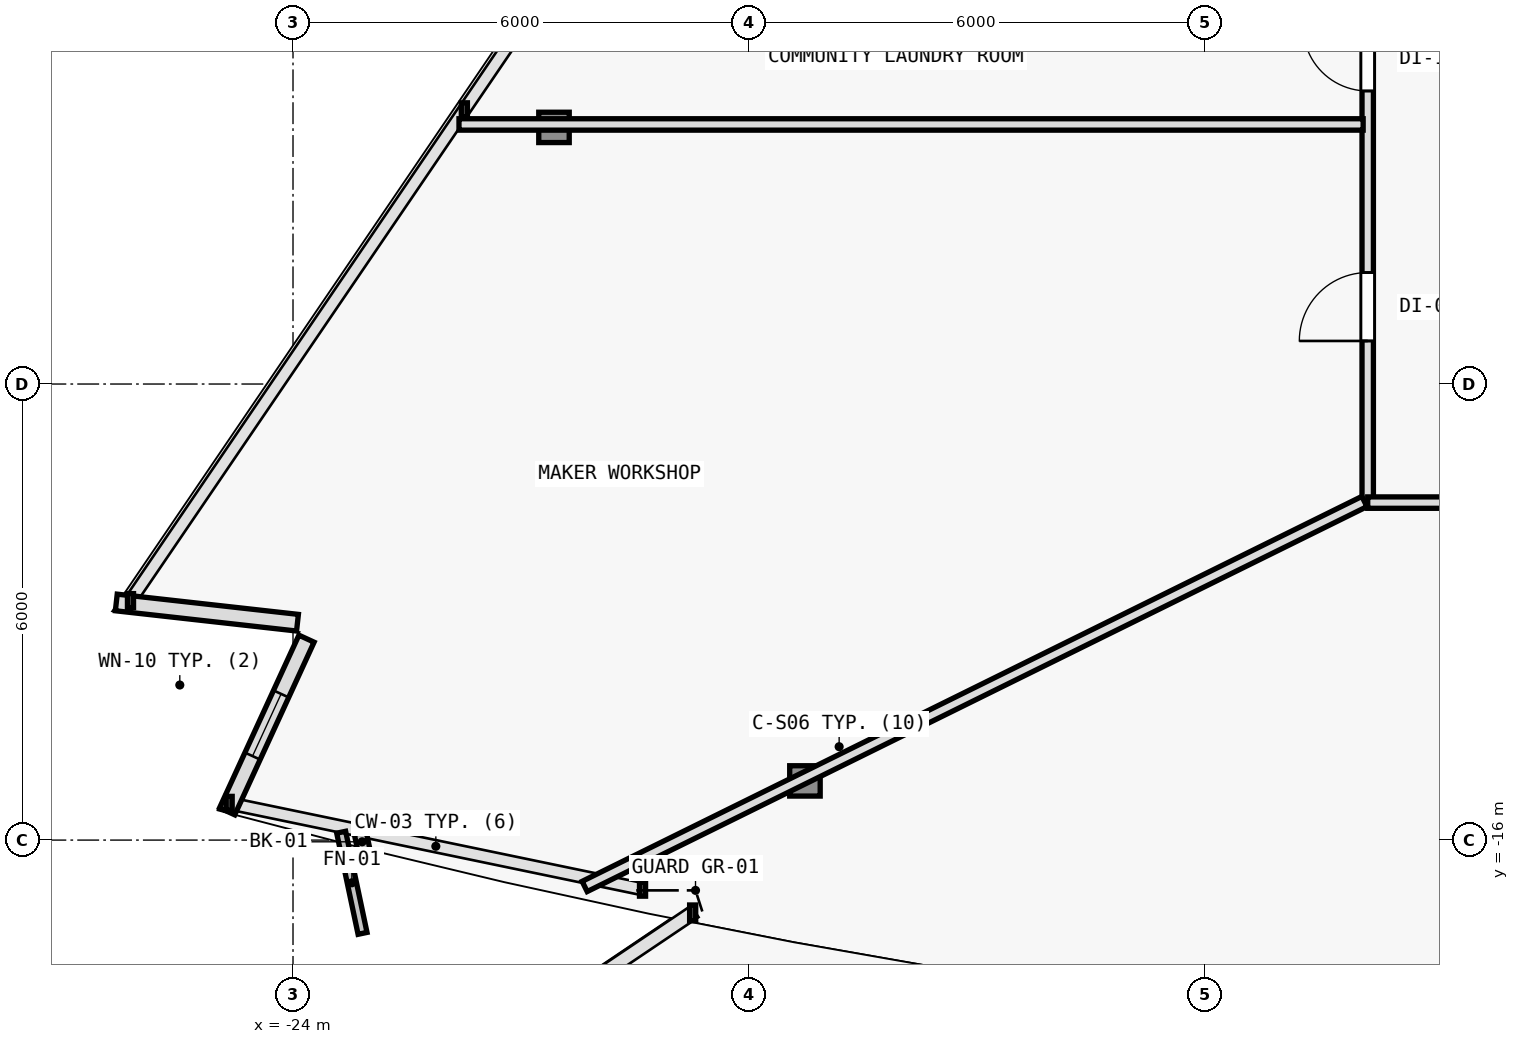
"""IFC4 building model, lengths in metres.
Left out: names, types, materials, properties, quantities, classifications, styles, units other than length and angle.
Written with IfcOpenShell. Run it as: python <this file> out.ifc"""

import sys

from ifc_helpers import new_model, si_unit, direction, frame, frame_2d, origin, origin_2d, place, context, subcontext, project, spatial, rectangle, i_section, extrude, element, fill, save


model = new_model("IFC4")
c1 = context("Model", 3, precision=1e-05, world=origin(), true_north=direction((0.0, 1.0)))
c2 = subcontext(c1, "Body", "Model", "MODEL_VIEW")
j1 = project(units=[si_unit("LENGTHUNIT", "METRE"), si_unit("PLANEANGLEUNIT", "RADIAN")], contexts=[c1])
p1 = place(None, origin())
s1 = spatial("IfcSite", under=j1, at=p1, CompositionType="ELEMENT")
p2 = place(p1, origin())
s2 = spatial("IfcBuilding", under=s1, at=p2, CompositionType="ELEMENT")
p3 = place(p2, frame((0.0, 0.0, 181.8)))
s3 = spatial("IfcBuildingStorey", under=s2, at=p3, CompositionType="ELEMENT", Elevation=181.8)
p4 = place(p3, frame((-17.264, -15.221, 0.005), z_axis=(0.020662834962, 0.033509136961, 0.999224792022), x_axis=(-0.851183725565, 0.524867855115, 0.0)))
e1 = element("IfcColumn", 1, at=p4, inside=s3, PredefinedType="COLUMN", context=c2, shape_type="SweptSolid", body=[
    extrude(i_section(OverallWidth=0.401, OverallDepth=0.399, WebThickness=0.016, FlangeThickness=0.025, FilletRadius=0.015, at=origin_2d()), origin(), (0.0, 0.0, 1.0), 3.592),
])
p5 = place(p3, frame((-20.566, -6.624, 0.005), z_axis=(0.025222449659, 0.021619242565, 0.999448065876), x_axis=(-0.650791373456, 0.759256602365, 0.0)))
e2 = element("IfcColumn", 2, at=p5, inside=s3, PredefinedType="COLUMN", context=c2, shape_type="SweptSolid", body=[
    extrude(i_section(OverallWidth=0.401, OverallDepth=0.399, WebThickness=0.016, FlangeThickness=0.025, FilletRadius=0.015, at=origin_2d()), origin(), (0.0, 0.0, 1.0), 3.591),
])
p6 = place(p3, frame((-23.941, -13.14, 0.0), z_axis=(0.0, 0.0, 1.0), x_axis=(-0.993825249999, 0.110956624245, 0.0)))
e3 = element("IfcWall", 3, at=p6, inside=s3, PredefinedType="SOLIDWALL", context=c2, shape_type="SweptSolid", body=[
    extrude(rectangle(XDim=2.398, YDim=0.22, at=frame_2d((1.199, 0.0))), origin(), (0.0, 0.0, 1.0), 3.28),
])
p7 = place(p3, frame((-24.866, -15.622, 0.0), z_axis=(0.0, 0.0, 1.0), x_axis=(0.417478378529, 0.908686856657, 0.0)))
e4 = element("IfcWall", 4, at=p7, inside=s3, PredefinedType="SOLIDWALL", context=c2, shape_type="SweptSolid", body=[
    extrude(rectangle(XDim=2.5, YDim=0.22, at=frame_2d((1.25, 0.0))), origin(), (0.0, 0.0, 1.0), 3.28),
])
p8 = place(p7, frame((0.8, 0.0, 0.62)))
e5 = element("IfcOpeningElement", 5, at=p8, cuts=e4, PredefinedType="OPENING", context=c2, shape_type="SweptSolid", body=[
    extrude(rectangle(XDim=0.9, YDim=1.6, at=frame_2d((0.45, 0.8))), frame((0.0, 0.12, 0.0), z_axis=(0.0, -1.0, 0.0), x_axis=(1.0, 0.0, 0.0)), (0.0, 0.0, 1.0), 0.24),
])
p9 = place(p3, frame((-9.86, -11.56, 0.0), z_axis=(0.0, 0.0, 1.0), x_axis=(0.0, 1.0, 0.0)))
e6 = element("IfcWall", 6, at=p9, inside=s3, PredefinedType="PARTITIONING", context=c2, shape_type="SweptSolid", body=[
    extrude(rectangle(XDim=19.986, YDim=0.15, at=frame_2d((9.993, 0.0))), origin(), (0.0, 0.0, 1.0), 2.755),
])
p10 = place(p9, frame((9.026, 0.0, 0.0)))
e7 = element("IfcOpeningElement", 7, at=p10, cuts=e6, PredefinedType="OPENING", context=c2, shape_type="SweptSolid", body=[
    extrude(rectangle(XDim=0.9, YDim=2.1, at=frame_2d((0.45, 1.05))), frame((0.0, 0.085, 0.0), z_axis=(0.0, -1.0, 0.0), x_axis=(1.0, 0.0, 0.0)), (0.0, 0.0, 1.0), 0.17),
])
p11 = place(p9, frame((7.096, 0.0, 0.0)))
e8 = element("IfcOpeningElement", 8, at=p11, cuts=e6, PredefinedType="OPENING", context=c2, shape_type="SweptSolid", body=[
    extrude(rectangle(XDim=0.85, YDim=2.1, at=frame_2d((0.425, 1.05))), frame((0.0, 0.085, 0.0), z_axis=(0.0, -1.0, 0.0), x_axis=(1.0, 0.0, 0.0)), (0.0, 0.0, 1.0), 0.17),
])
p12 = place(p9, frame((5.416, 0.0, 0.0)))
e9 = element("IfcOpeningElement", 9, at=p12, cuts=e6, PredefinedType="OPENING", context=c2, shape_type="SweptSolid", body=[
    extrude(rectangle(XDim=0.85, YDim=2.1, at=frame_2d((0.425, 1.05))), frame((0.0, 0.085, 0.0), z_axis=(0.0, -1.0, 0.0), x_axis=(1.0, 0.0, 0.0)), (0.0, 0.0, 1.0), 0.17),
])
p13 = place(p9, frame((2.127, 0.0, 0.0)))
e10 = element("IfcOpeningElement", 10, at=p13, cuts=e6, PredefinedType="OPENING", context=c2, shape_type="SweptSolid", body=[
    extrude(rectangle(XDim=0.9, YDim=2.1, at=frame_2d((0.45, 1.05))), frame((0.0, 0.085, 0.0), z_axis=(0.0, -1.0, 0.0), x_axis=(1.0, 0.0, 0.0)), (0.0, 0.0, 1.0), 0.17),
])
p14 = place(p9, frame((13.855, 0.0, 0.0)))
e11 = element("IfcOpeningElement", 11, at=p14, cuts=e6, PredefinedType="OPENING", context=c2, shape_type="SweptSolid", body=[
    extrude(rectangle(XDim=0.85, YDim=2.1, at=frame_2d((0.425, 1.05))), frame((0.0, 0.085, 0.0), z_axis=(0.0, -1.0, 0.0), x_axis=(1.0, 0.0, 0.0)), (0.0, 0.0, 1.0), 0.17),
])
p15 = place(p9, frame((11.576, 0.0, 0.0)))
e12 = element("IfcOpeningElement", 12, at=p15, cuts=e6, PredefinedType="OPENING", context=c2, shape_type="SweptSolid", body=[
    extrude(rectangle(XDim=0.9, YDim=2.1, at=frame_2d((0.45, 1.05))), frame((0.0, 0.085, 0.0), z_axis=(0.0, -1.0, 0.0), x_axis=(1.0, 0.0, 0.0)), (0.0, 0.0, 1.0), 0.17),
])
p16 = place(p3, frame((13.18, -11.56, 0.0), z_axis=(0.0, 0.0, 1.0), x_axis=(-1.0, 0.0, 0.0)))
e13 = element("IfcWall", 13, at=p16, inside=s3, PredefinedType="PARTITIONING", context=c2, shape_type="SweptSolid", body=[
    extrude(rectangle(XDim=23.04, YDim=0.15, at=frame_2d((11.52, 0.0))), origin(), (0.0, 0.0, 1.0), 2.755),
])
p17 = place(p16, frame((14.684, 0.0, 0.0)))
e14 = element("IfcOpeningElement", 14, at=p17, cuts=e13, PredefinedType="OPENING", context=c2, shape_type="SweptSolid", body=[
    extrude(rectangle(XDim=0.9, YDim=2.1, at=frame_2d((0.45, 1.05))), frame((0.0, 0.085, 0.0), z_axis=(0.0, -1.0, 0.0), x_axis=(1.0, 0.0, 0.0)), (0.0, 0.0, 1.0), 0.17),
])
p18 = place(p16, frame((5.822, 0.0, 0.0)))
e15 = element("IfcOpeningElement", 15, at=p18, cuts=e13, PredefinedType="OPENING", context=c2, shape_type="SweptSolid", body=[
    extrude(rectangle(XDim=0.9, YDim=2.1, at=frame_2d((0.45, 1.05))), frame((0.0, 0.085, 0.0), z_axis=(0.0, -1.0, 0.0), x_axis=(1.0, 0.0, 0.0)), (0.0, 0.0, 1.0), 0.17),
])
p19 = place(p16, frame((3.331, 0.0, 0.0)))
e16 = element("IfcOpeningElement", 16, at=p19, cuts=e13, PredefinedType="OPENING", context=c2, shape_type="SweptSolid", body=[
    extrude(rectangle(XDim=0.9, YDim=2.1, at=frame_2d((0.45, 1.05))), frame((0.0, 0.085, 0.0), z_axis=(0.0, -1.0, 0.0), x_axis=(1.0, 0.0, 0.0)), (0.0, 0.0, 1.0), 0.17),
])
p20 = place(p16, frame((0.851, 0.0, 0.0)))
e17 = element("IfcOpeningElement", 17, at=p20, cuts=e13, PredefinedType="OPENING", context=c2, shape_type="SweptSolid", body=[
    extrude(rectangle(XDim=0.9, YDim=2.1, at=frame_2d((0.45, 1.05))), frame((0.0, 0.085, 0.0), z_axis=(0.0, -1.0, 0.0), x_axis=(1.0, 0.0, 0.0)), (0.0, 0.0, 1.0), 0.17),
])
p21 = place(p3, frame((-9.903, -11.546, 0.0), z_axis=(0.0, 0.0, 1.0), x_axis=(-0.896703019524, -0.442632686069, 0.0)))
e18 = element("IfcWall", 18, at=p21, inside=s3, PredefinedType="PARTITIONING", context=c2, shape_type="SweptSolid", body=[
    extrude(rectangle(XDim=11.441, YDim=0.15, at=frame_2d((5.721, 0.0))), origin(), (0.0, 0.0, 1.0), 2.755),
])
p22 = place(p3, frame((-9.92, -6.585, 0.0), z_axis=(0.0, 0.0, 1.0), x_axis=(-1.0, 0.0, 0.0)))
e19 = element("IfcWall", 19, at=p22, inside=s3, PredefinedType="PARTITIONING", context=c2, shape_type="SweptSolid", body=[
    extrude(rectangle(XDim=11.896, YDim=0.15, at=frame_2d((5.948, 0.0))), origin(), (0.0, 0.0, 1.0), 2.755),
])
p23 = place(p8, origin())
e20 = element("IfcWindow", 20, at=p23, inside=s3, PartitioningType="SINGLE_PANEL", PredefinedType="WINDOW", context=c2, shape_type="SweptSolid", body=[
    extrude(rectangle(XDim=0.9, YDim=1.6, at=frame_2d((0.45, 0.8))), frame((0.0, 0.03, 0.0), z_axis=(0.0, -1.0, 0.0), x_axis=(1.0, 0.0, 0.0)), (0.0, 0.0, 1.0), 0.06),
])
fill(e5, e20)
p24 = place(p12, origin())
e21 = element("IfcDoor", 21, at=p24, inside=s3, OperationType="SINGLE_SWING_RIGHT", PredefinedType="DOOR", context=c2, shape_type="SweptSolid", body=[
    extrude(rectangle(XDim=0.85, YDim=2.1, at=frame_2d((0.425, 1.05))), frame((0.0, 0.025, 0.0), z_axis=(0.0, -1.0, 0.0), x_axis=(1.0, 0.0, 0.0)), (0.0, 0.0, 1.0), 0.05),
])
fill(e9, e21)
p25 = place(p13, origin())
e22 = element("IfcDoor", 22, at=p25, inside=s3, OperationType="SINGLE_SWING_LEFT", PredefinedType="DOOR", context=c2, shape_type="SweptSolid", body=[
    extrude(rectangle(XDim=0.9, YDim=2.1, at=frame_2d((0.45, 1.05))), frame((0.0, 0.025, 0.0), z_axis=(0.0, -1.0, 0.0), x_axis=(1.0, 0.0, 0.0)), (0.0, 0.0, 1.0), 0.05),
])
fill(e10, e22)
save(model, sys.argv[1])
